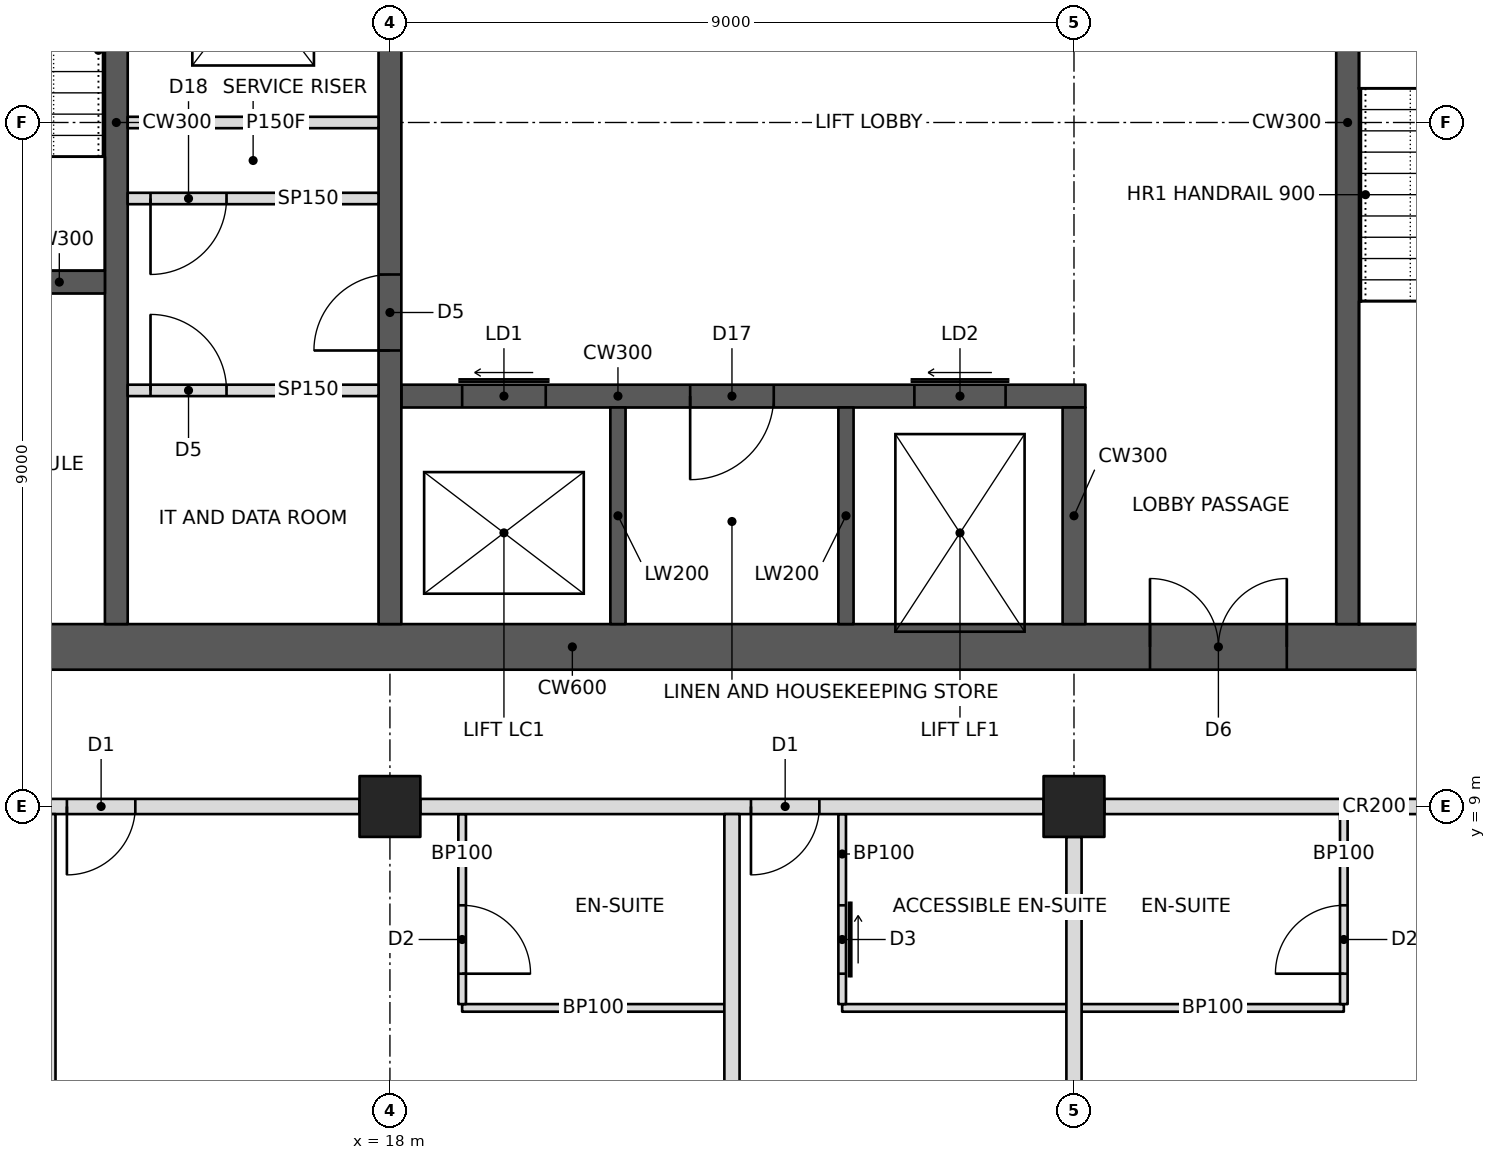
"""IFC4 building model, lengths in metres.
Left out: names, types, materials, properties, quantities, classifications, styles, units other than length and angle.
Written with IfcOpenShell. Run it as: python <this file> out.ifc"""

import sys

from ifc_helpers import new_model, si_unit, direction, frame, frame_2d, origin, origin_2d, place, context, subcontext, project, spatial, rectangle, hollow_rectangle, extrude, element, fill, save


model = new_model("IFC4")
c1 = context("Model", 3, precision=1e-05, world=origin(), true_north=direction((0.0, 1.0)))
c2 = subcontext(c1, "Body", "Model", "MODEL_VIEW")
j1 = project(units=[si_unit("LENGTHUNIT", "METRE"), si_unit("PLANEANGLEUNIT", "RADIAN")], contexts=[c1])
p1 = place(None, origin())
s1 = spatial("IfcSite", under=j1, at=p1, CompositionType="ELEMENT")
p2 = place(p1, origin())
s2 = spatial("IfcBuilding", under=s1, at=p2, CompositionType="ELEMENT")
p3 = place(p2, frame((0.0, 0.0, 233.8)))
s3 = spatial("IfcBuildingStorey", under=s2, at=p3, CompositionType="ELEMENT", Elevation=233.8)
for number, where, z_axis, x_axis in (
    (1, (18.0, 9.0, 0.0), (0.0, 0.0, 1.0), (1.0, 0.0, 0.0)),
    (2, (27.0, 9.0, 0.0), (0.0, 0.0, 1.0), (1.0, 0.0, 0.0)),
):
    element("IfcColumn", number, at=place(p3, frame(where, z_axis=z_axis, x_axis=x_axis)), inside=s3, PredefinedType="COLUMN", context=c2, shape_type="SweptSolid", body=[
        extrude(hollow_rectangle(XDim=0.8, YDim=0.8, WallThickness=0.04, at=origin_2d()), origin(), (0.0, 0.0, 1.0), 3.6),
    ])
p4 = place(p3, frame((10.8, 11.1, 0.0), z_axis=(0.0, 0.0, 1.0), x_axis=(1.0, 0.0, 0.0)))
e3 = element("IfcWall", 3, at=p4, inside=s3, PredefinedType="SHEAR", context=c2, shape_type="SweptSolid", body=[
    extrude(rectangle(XDim=23.4, YDim=0.6, at=frame_2d((11.7, 0.0))), origin(), (0.0, 0.0, 1.0), 3.6),
])
p5 = place(p4, frame((1.0, 0.0, 0.0)))
e4 = element("IfcOpeningElement", 4, at=p5, cuts=e3, PredefinedType="OPENING", context=c2, shape_type="SweptSolid", body=[
    extrude(rectangle(XDim=1.0, YDim=2.1, at=frame_2d((0.5, 1.05))), frame((0.0, 0.31, 0.0), z_axis=(0.0, -1.0, 0.0), x_axis=(1.0, 0.0, 0.0)), (0.0, 0.0, 1.0), 0.62),
])
p6 = place(p4, frame((17.2, 0.0, 0.0)))
e5 = element("IfcOpeningElement", 5, at=p6, cuts=e3, PredefinedType="OPENING", context=c2, shape_type="SweptSolid", body=[
    extrude(rectangle(XDim=1.8, YDim=2.1, at=frame_2d((0.9, 1.05))), frame((0.0, 0.31, 0.0), z_axis=(0.0, -1.0, 0.0), x_axis=(1.0, 0.0, 0.0)), (0.0, 0.0, 1.0), 0.62),
])
p7 = place(p3, frame((14.4, 11.4, 0.0), z_axis=(0.0, 0.0, 1.0), x_axis=(0.0, 1.0, 0.0)))
e6 = element("IfcWall", 6, at=p7, inside=s3, PredefinedType="SHEAR", context=c2, shape_type="SweptSolid", body=[
    extrude(rectangle(XDim=13.2, YDim=0.3, at=frame_2d((6.6, 0.0))), origin(), (0.0, 0.0, 1.0), 3.6),
])
p8 = place(p3, frame((11.4, 15.9, 0.0), z_axis=(0.0, 0.0, 1.0), x_axis=(1.0, 0.0, 0.0)))
e7 = element("IfcWall", 7, at=p8, inside=s3, PredefinedType="SHEAR", context=c2, shape_type="SweptSolid", body=[
    extrude(rectangle(XDim=2.85, YDim=0.3, at=frame_2d((1.425, 0.0))), origin(), (0.0, 0.0, 1.0), 3.6),
])
p9 = place(p8, frame((0.5, 0.0, 0.0)))
e8 = element("IfcOpeningElement", 8, at=p9, cuts=e7, PredefinedType="OPENING", context=c2, shape_type="SweptSolid", body=[
    extrude(rectangle(XDim=1.0, YDim=2.1, at=frame_2d((0.5, 1.05))), frame((0.0, 0.16, 0.0), z_axis=(0.0, -1.0, 0.0), x_axis=(1.0, 0.0, 0.0)), (0.0, 0.0, 1.0), 0.32),
])
p10 = place(p3, frame((18.0, 11.4, 0.0), z_axis=(0.0, 0.0, 1.0), x_axis=(0.0, 1.0, 0.0)))
e9 = element("IfcWall", 9, at=p10, inside=s3, PredefinedType="SHEAR", context=c2, shape_type="SweptSolid", body=[
    extrude(rectangle(XDim=13.2, YDim=0.3, at=frame_2d((6.6, 0.0))), origin(), (0.0, 0.0, 1.0), 3.6),
])
p11 = place(p10, frame((3.6, 0.0, 0.0)))
e10 = element("IfcOpeningElement", 10, at=p11, cuts=e9, PredefinedType="OPENING", context=c2, shape_type="SweptSolid", body=[
    extrude(rectangle(XDim=1.0, YDim=2.1, at=frame_2d((0.5, 1.05))), frame((0.0, 0.16, 0.0), z_axis=(0.0, -1.0, 0.0), x_axis=(1.0, 0.0, 0.0)), (0.0, 0.0, 1.0), 0.32),
])
p12 = place(p10, frame((7.85, 0.0, 0.0)))
e11 = element("IfcOpeningElement", 11, at=p12, cuts=e9, PredefinedType="OPENING", context=c2, shape_type="SweptSolid", body=[
    extrude(rectangle(XDim=1.1, YDim=2.1, at=frame_2d((0.55, 1.05))), frame((0.0, 0.16, 0.0), z_axis=(0.0, -1.0, 0.0), x_axis=(1.0, 0.0, 0.0)), (0.0, 0.0, 1.0), 0.32),
])
p13 = place(p3, frame((14.55, 18.0, 0.0), z_axis=(0.0, 0.0, 1.0), x_axis=(1.0, 0.0, 0.0)))
e12 = element("IfcWall", 12, at=p13, inside=s3, PredefinedType="PARTITIONING", context=c2, shape_type="SweptSolid", body=[
    extrude(rectangle(XDim=3.3, YDim=0.15, at=frame_2d((1.65, 0.0))), origin(), (0.0, 0.0, 1.0), 3.4),
])
p14 = place(p3, frame((18.15, 14.4, 0.0), z_axis=(0.0, 0.0, 1.0), x_axis=(1.0, 0.0, 0.0)))
e13 = element("IfcWall", 13, at=p14, inside=s3, PredefinedType="SHEAR", context=c2, shape_type="SweptSolid", body=[
    extrude(rectangle(XDim=9.0, YDim=0.3, at=frame_2d((4.5, 0.0))), origin(), (0.0, 0.0, 1.0), 3.6),
])
p15 = place(p14, frame((0.8, 0.0, 0.0)))
e14 = element("IfcOpeningElement", 14, at=p15, cuts=e13, PredefinedType="OPENING", context=c2, shape_type="SweptSolid", body=[
    extrude(rectangle(XDim=1.1, YDim=2.1, at=frame_2d((0.55, 1.05))), frame((0.0, 0.16, 0.0), z_axis=(0.0, -1.0, 0.0), x_axis=(1.0, 0.0, 0.0)), (0.0, 0.0, 1.0), 0.32),
])
p16 = place(p14, frame((6.75, 0.0, 0.0)))
e15 = element("IfcOpeningElement", 15, at=p16, cuts=e13, PredefinedType="OPENING", context=c2, shape_type="SweptSolid", body=[
    extrude(rectangle(XDim=1.2, YDim=2.1, at=frame_2d((0.6, 1.05))), frame((0.0, 0.16, 0.0), z_axis=(0.0, -1.0, 0.0), x_axis=(1.0, 0.0, 0.0)), (0.0, 0.0, 1.0), 0.32),
])
p17 = place(p14, frame((3.8, 0.0, 0.0)))
e16 = element("IfcOpeningElement", 16, at=p17, cuts=e13, PredefinedType="OPENING", context=c2, shape_type="SweptSolid", body=[
    extrude(rectangle(XDim=1.1, YDim=2.1, at=frame_2d((0.55, 1.05))), frame((0.0, 0.16, 0.0), z_axis=(0.0, -1.0, 0.0), x_axis=(1.0, 0.0, 0.0)), (0.0, 0.0, 1.0), 0.32),
])
p18 = place(p3, frame((27.0, 11.4, 0.0), z_axis=(0.0, 0.0, 1.0), x_axis=(0.0, 1.0, 0.0)))
e17 = element("IfcWall", 17, at=p18, inside=s3, PredefinedType="SHEAR", context=c2, shape_type="SweptSolid", body=[
    extrude(rectangle(XDim=2.85, YDim=0.3, at=frame_2d((1.425, 0.0))), origin(), (0.0, 0.0, 1.0), 3.6),
])
for number, where, z_axis, x_axis in (
    (18, (21.0, 11.4, 0.0), (0.0, 0.0, 1.0), (0.0, 1.0, 0.0)),
    (19, (24.0, 11.4, 0.0), (0.0, 0.0, 1.0), (0.0, 1.0, 0.0)),
):
    element("IfcWall", number, at=place(p3, frame(where, z_axis=z_axis, x_axis=x_axis)), inside=s3, PredefinedType="SHEAR", context=c2, shape_type="SweptSolid", body=[
        extrude(rectangle(XDim=2.85, YDim=0.2, at=frame_2d((1.425, 0.0))), origin(), (0.0, 0.0, 1.0), 3.6),
    ])
p19 = place(p3, frame((30.6, 11.4, 0.0), z_axis=(0.0, 0.0, 1.0), x_axis=(0.0, 1.0, 0.0)))
e20 = element("IfcWall", 20, at=p19, inside=s3, PredefinedType="SHEAR", context=c2, shape_type="SweptSolid", body=[
    extrude(rectangle(XDim=13.2, YDim=0.3, at=frame_2d((6.6, 0.0))), origin(), (0.0, 0.0, 1.0), 3.6),
])
p20 = place(p3, frame((9.4, 9.0, 0.0), z_axis=(0.0, 0.0, 1.0), x_axis=(1.0, 0.0, 0.0)))
e21 = element("IfcWall", 21, at=p20, inside=s3, PredefinedType="PARTITIONING", context=c2, shape_type="SweptSolid", body=[
    extrude(rectangle(XDim=8.2, YDim=0.2, at=frame_2d((4.1, 0.0))), origin(), (0.0, 0.0, 1.0), 2.605),
])
p21 = place(p20, frame((2.95, 0.0, 0.0)))
e22 = element("IfcOpeningElement", 22, at=p21, cuts=e21, PredefinedType="OPENING", context=c2, shape_type="SweptSolid", body=[
    extrude(rectangle(XDim=0.9, YDim=2.1, at=frame_2d((0.45, 1.05))), frame((0.0, 0.11, 0.0), z_axis=(0.0, -1.0, 0.0), x_axis=(1.0, 0.0, 0.0)), (0.0, 0.0, 1.0), 0.22),
])
p22 = place(p20, frame((4.35, 0.0, 0.0)))
e23 = element("IfcOpeningElement", 23, at=p22, cuts=e21, PredefinedType="OPENING", context=c2, shape_type="SweptSolid", body=[
    extrude(rectangle(XDim=0.9, YDim=2.1, at=frame_2d((0.45, 1.05))), frame((0.0, 0.11, 0.0), z_axis=(0.0, -1.0, 0.0), x_axis=(1.0, 0.0, 0.0)), (0.0, 0.0, 1.0), 0.22),
])
p23 = place(p3, frame((18.4, 9.0, 0.0), z_axis=(0.0, 0.0, 1.0), x_axis=(1.0, 0.0, 0.0)))
e24 = element("IfcWall", 24, at=p23, inside=s3, PredefinedType="PARTITIONING", context=c2, shape_type="SweptSolid", body=[
    extrude(rectangle(XDim=8.2, YDim=0.2, at=frame_2d((4.1, 0.0))), origin(), (0.0, 0.0, 1.0), 2.605),
])
p24 = place(p23, frame((4.35, 0.0, 0.0)))
e25 = element("IfcOpeningElement", 25, at=p24, cuts=e24, PredefinedType="OPENING", context=c2, shape_type="SweptSolid", body=[
    extrude(rectangle(XDim=0.9, YDim=2.1, at=frame_2d((0.45, 1.05))), frame((0.0, 0.11, 0.0), z_axis=(0.0, -1.0, 0.0), x_axis=(1.0, 0.0, 0.0)), (0.0, 0.0, 1.0), 0.22),
])
p25 = place(p3, frame((27.4, 9.0, 0.0), z_axis=(0.0, 0.0, 1.0), x_axis=(1.0, 0.0, 0.0)))
e26 = element("IfcWall", 26, at=p25, inside=s3, PredefinedType="PARTITIONING", context=c2, shape_type="SweptSolid", body=[
    extrude(rectangle(XDim=8.368, YDim=0.2, at=frame_2d((4.184, 0.0))), origin(), (0.0, 0.0, 1.0), 2.605),
])
p26 = place(p25, frame((7.25, 0.0, 0.0)))
e27 = element("IfcOpeningElement", 27, at=p26, cuts=e26, PredefinedType="OPENING", context=c2, shape_type="SweptSolid", body=[
    extrude(rectangle(XDim=0.9, YDim=2.1, at=frame_2d((0.45, 1.05))), frame((0.0, 0.11, 0.0), z_axis=(0.0, -1.0, 0.0), x_axis=(1.0, 0.0, 0.0)), (0.0, 0.0, 1.0), 0.22),
])
for number, where, z_axis, x_axis in (
    (28, (13.5, 8.9, 0.0), (0.0, 0.0, 1.0), (0.0, -1.0, 0.0)),
    (29, (22.5, 8.9, 0.0), (0.0, 0.0, 1.0), (0.0, -1.0, 0.0)),
):
    element("IfcWall", number, at=place(p3, frame(where, z_axis=z_axis, x_axis=x_axis)), inside=s3, PredefinedType="PARTITIONING", context=c2, shape_type="SweptSolid", body=[
        extrude(rectangle(XDim=7.9, YDim=0.2, at=frame_2d((3.95, 0.0))), origin(), (0.0, 0.0, 1.0), 2.604),
    ])
p27 = place(p3, frame((27.0, 8.6, 0.0), z_axis=(0.0, 0.0, 1.0), x_axis=(0.0, -1.0, 0.0)))
e30 = element("IfcWall", 30, at=p27, inside=s3, PredefinedType="PARTITIONING", context=c2, shape_type="SweptSolid", body=[
    extrude(rectangle(XDim=7.6, YDim=0.2, at=frame_2d((3.8, 0.0))), origin(), (0.0, 0.0, 1.0), 2.605),
])
p28 = place(p3, frame((18.95, 6.35, 0.0), z_axis=(0.0, 0.0, 1.0), x_axis=(1.0, 0.0, 0.0)))
e31 = element("IfcWall", 31, at=p28, inside=s3, PredefinedType="PARTITIONING", context=c2, shape_type="SweptSolid", body=[
    extrude(rectangle(XDim=3.45, YDim=0.1, at=frame_2d((1.725, 0.0))), origin(), (0.0, 0.0, 1.0), 3.4),
])
p29 = place(p3, frame((18.95, 8.9, 0.0), z_axis=(0.0, 0.0, 1.0), x_axis=(0.0, -1.0, 0.0)))
e32 = element("IfcWall", 32, at=p29, inside=s3, PredefinedType="PARTITIONING", context=c2, shape_type="SweptSolid", body=[
    extrude(rectangle(XDim=2.5, YDim=0.1, at=frame_2d((1.25, 0.0))), origin(), (0.0, 0.0, 1.0), 2.604),
])
p30 = place(p29, frame((1.2, 0.0, 0.0)))
e33 = element("IfcOpeningElement", 33, at=p30, cuts=e32, PredefinedType="OPENING", context=c2, shape_type="SweptSolid", body=[
    extrude(rectangle(XDim=0.9, YDim=2.1, at=frame_2d((0.45, 1.05))), frame((0.0, 0.06, 0.0), z_axis=(0.0, -1.0, 0.0), x_axis=(1.0, 0.0, 0.0)), (0.0, 0.0, 1.0), 0.12),
])
p31 = place(p3, frame((23.95, 6.35, 0.0), z_axis=(0.0, 0.0, 1.0), x_axis=(1.0, 0.0, 0.0)))
e34 = element("IfcWall", 34, at=p31, inside=s3, PredefinedType="PARTITIONING", context=c2, shape_type="SweptSolid", body=[
    extrude(rectangle(XDim=2.95, YDim=0.1, at=frame_2d((1.475, 0.0))), origin(), (0.0, 0.0, 1.0), 2.604),
])
p32 = place(p3, frame((23.95, 8.9, 0.0), z_axis=(0.0, 0.0, 1.0), x_axis=(0.0, -1.0, 0.0)))
e35 = element("IfcWall", 35, at=p32, inside=s3, PredefinedType="PARTITIONING", context=c2, shape_type="SweptSolid", body=[
    extrude(rectangle(XDim=2.5, YDim=0.1, at=frame_2d((1.25, 0.0))), origin(), (0.0, 0.0, 1.0), 2.604),
])
p33 = place(p32, frame((1.2, 0.0, 0.0)))
e36 = element("IfcOpeningElement", 36, at=p33, cuts=e35, PredefinedType="OPENING", context=c2, shape_type="SweptSolid", body=[
    extrude(rectangle(XDim=0.9, YDim=2.1, at=frame_2d((0.45, 1.05))), frame((0.0, 0.06, 0.0), z_axis=(0.0, -1.0, 0.0), x_axis=(1.0, 0.0, 0.0)), (0.0, 0.0, 1.0), 0.12),
])
p34 = place(p3, frame((27.1, 6.35, 0.0), z_axis=(0.0, 0.0, 1.0), x_axis=(1.0, 0.0, 0.0)))
e37 = element("IfcWall", 37, at=p34, inside=s3, PredefinedType="PARTITIONING", context=c2, shape_type="SweptSolid", body=[
    extrude(rectangle(XDim=3.45, YDim=0.1, at=frame_2d((1.725, 0.0))), origin(), (0.0, 0.0, 1.0), 2.604),
])
p35 = place(p3, frame((30.55, 8.9, 0.0), z_axis=(0.0, 0.0, 1.0), x_axis=(0.0, -1.0, 0.0)))
e38 = element("IfcWall", 38, at=p35, inside=s3, PredefinedType="PARTITIONING", context=c2, shape_type="SweptSolid", body=[
    extrude(rectangle(XDim=2.5, YDim=0.1, at=frame_2d((1.25, 0.0))), origin(), (0.0, 0.0, 1.0), 2.604),
])
p36 = place(p35, frame((1.2, 0.0, 0.0)))
e39 = element("IfcOpeningElement", 39, at=p36, cuts=e38, PredefinedType="OPENING", context=c2, shape_type="SweptSolid", body=[
    extrude(rectangle(XDim=0.9, YDim=2.1, at=frame_2d((0.45, 1.05))), frame((0.0, 0.06, 0.0), z_axis=(0.0, -1.0, 0.0), x_axis=(1.0, 0.0, 0.0)), (0.0, 0.0, 1.0), 0.12),
])
p37 = place(p3, frame((14.55, 17.0, 0.0), z_axis=(0.0, 0.0, 1.0), x_axis=(1.0, 0.0, 0.0)))
e40 = element("IfcWall", 40, at=p37, inside=s3, PredefinedType="PARTITIONING", context=c2, shape_type="SweptSolid", body=[
    extrude(rectangle(XDim=3.3, YDim=0.15, at=frame_2d((1.65, 0.0))), origin(), (0.0, 0.0, 1.0), 3.4),
])
p38 = place(p37, frame((0.3, 0.0, 0.0)))
e41 = element("IfcOpeningElement", 41, at=p38, cuts=e40, PredefinedType="OPENING", context=c2, shape_type="SweptSolid", body=[
    extrude(rectangle(XDim=1.0, YDim=2.1, at=frame_2d((0.5, 1.05))), frame((0.0, 0.085, 0.0), z_axis=(0.0, -1.0, 0.0), x_axis=(1.0, 0.0, 0.0)), (0.0, 0.0, 1.0), 0.17),
])
p39 = place(p3, frame((14.55, 14.475, 0.0), z_axis=(0.0, 0.0, 1.0), x_axis=(1.0, 0.0, 0.0)))
e42 = element("IfcWall", 42, at=p39, inside=s3, PredefinedType="PARTITIONING", context=c2, shape_type="SweptSolid", body=[
    extrude(rectangle(XDim=3.3, YDim=0.15, at=frame_2d((1.65, 0.0))), origin(), (0.0, 0.0, 1.0), 3.4),
])
p40 = place(p39, frame((0.3, 0.0, 0.0)))
e43 = element("IfcOpeningElement", 43, at=p40, cuts=e42, PredefinedType="OPENING", context=c2, shape_type="SweptSolid", body=[
    extrude(rectangle(XDim=1.0, YDim=2.1, at=frame_2d((0.5, 1.05))), frame((0.0, 0.085, 0.0), z_axis=(0.0, -1.0, 0.0), x_axis=(1.0, 0.0, 0.0)), (0.0, 0.0, 1.0), 0.17),
])
p41 = place(p30, origin())
e44 = element("IfcDoor", 44, at=p41, inside=s3, OperationType="SINGLE_SWING_RIGHT", PredefinedType="DOOR", context=c2, shape_type="SweptSolid", body=[
    extrude(rectangle(XDim=0.9, YDim=2.1, at=frame_2d((0.45, 1.05))), frame((0.0, 0.025, 0.0), z_axis=(0.0, -1.0, 0.0), x_axis=(1.0, 0.0, 0.0)), (0.0, 0.0, 1.0), 0.05),
])
fill(e33, e44)
p42 = place(p22, frame((0.9, 0.0, 0.0), z_axis=(0.0, 0.0, 1.0), x_axis=(-1.0, 0.0, 0.0)))
e45 = element("IfcDoor", 45, at=p42, inside=s3, OperationType="SINGLE_SWING_RIGHT", PredefinedType="DOOR", context=c2, shape_type="SweptSolid", body=[
    extrude(rectangle(XDim=0.9, YDim=2.1, at=frame_2d((0.45, 1.05))), frame((0.0, 0.025, 0.0), z_axis=(0.0, -1.0, 0.0), x_axis=(1.0, 0.0, 0.0)), (0.0, 0.0, 1.0), 0.05),
])
fill(e23, e45)
p43 = place(p33, origin())
e46 = element("IfcDoor", 46, at=p43, inside=s3, OperationType="SLIDING_TO_LEFT", PredefinedType="DOOR", context=c2, shape_type="SweptSolid", body=[
    extrude(rectangle(XDim=0.9, YDim=2.1, at=frame_2d((0.45, 1.05))), frame((0.0, 0.025, 0.0), z_axis=(0.0, -1.0, 0.0), x_axis=(1.0, 0.0, 0.0)), (0.0, 0.0, 1.0), 0.05),
])
fill(e36, e46)
p44 = place(p24, frame((0.9, 0.0, 0.0), z_axis=(0.0, 0.0, 1.0), x_axis=(-1.0, 0.0, 0.0)))
e47 = element("IfcDoor", 47, at=p44, inside=s3, OperationType="SINGLE_SWING_RIGHT", PredefinedType="DOOR", context=c2, shape_type="SweptSolid", body=[
    extrude(rectangle(XDim=0.9, YDim=2.1, at=frame_2d((0.45, 1.05))), frame((0.0, 0.025, 0.0), z_axis=(0.0, -1.0, 0.0), x_axis=(1.0, 0.0, 0.0)), (0.0, 0.0, 1.0), 0.05),
])
fill(e25, e47)
p45 = place(p36, frame((0.9, 0.0, 0.0), z_axis=(0.0, 0.0, 1.0), x_axis=(-1.0, 0.0, 0.0)))
e48 = element("IfcDoor", 48, at=p45, inside=s3, OperationType="SINGLE_SWING_LEFT", PredefinedType="DOOR", context=c2, shape_type="SweptSolid", body=[
    extrude(rectangle(XDim=0.9, YDim=2.1, at=frame_2d((0.45, 1.05))), frame((0.0, 0.025, 0.0), z_axis=(0.0, -1.0, 0.0), x_axis=(1.0, 0.0, 0.0)), (0.0, 0.0, 1.0), 0.05),
])
fill(e39, e48)
p46 = place(p38, frame((1.0, 0.0, 0.0), z_axis=(0.0, 0.0, 1.0), x_axis=(-1.0, 0.0, 0.0)))
e49 = element("IfcDoor", 49, at=p46, inside=s3, OperationType="SINGLE_SWING_RIGHT", PredefinedType="DOOR", context=c2, shape_type="SweptSolid", body=[
    extrude(rectangle(XDim=1.0, YDim=2.1, at=frame_2d((0.5, 1.05))), frame((0.0, 0.025, 0.0), z_axis=(0.0, -1.0, 0.0), x_axis=(1.0, 0.0, 0.0)), (0.0, 0.0, 1.0), 0.05),
])
fill(e41, e49)
p47 = place(p40, origin())
e50 = element("IfcDoor", 50, at=p47, inside=s3, OperationType="SINGLE_SWING_LEFT", PredefinedType="DOOR", context=c2, shape_type="SweptSolid", body=[
    extrude(rectangle(XDim=1.0, YDim=2.1, at=frame_2d((0.5, 1.05))), frame((0.0, 0.025, 0.0), z_axis=(0.0, -1.0, 0.0), x_axis=(1.0, 0.0, 0.0)), (0.0, 0.0, 1.0), 0.05),
])
fill(e43, e50)
p48 = place(p6, origin())
e51 = element("IfcDoor", 51, at=p48, inside=s3, OperationType="DOUBLE_DOOR_SINGLE_SWING", PredefinedType="DOOR", context=c2, shape_type="SweptSolid", body=[
    extrude(rectangle(XDim=1.8, YDim=2.1, at=frame_2d((0.9, 1.05))), frame((0.0, 0.025, 0.0), z_axis=(0.0, -1.0, 0.0), x_axis=(1.0, 0.0, 0.0)), (0.0, 0.0, 1.0), 0.05),
])
fill(e5, e51)
p49 = place(p11, origin())
e52 = element("IfcDoor", 52, at=p49, inside=s3, OperationType="SINGLE_SWING_LEFT", PredefinedType="DOOR", context=c2, shape_type="SweptSolid", body=[
    extrude(rectangle(XDim=1.0, YDim=2.1, at=frame_2d((0.5, 1.05))), frame((0.0, 0.025, 0.0), z_axis=(0.0, -1.0, 0.0), x_axis=(1.0, 0.0, 0.0)), (0.0, 0.0, 1.0), 0.05),
])
fill(e10, e52)
p50 = place(p15, origin())
e53 = element("IfcDoor", 53, at=p50, inside=s3, OperationType="SLIDING_TO_LEFT", PredefinedType="DOOR", context=c2, shape_type="SweptSolid", body=[
    extrude(rectangle(XDim=1.1, YDim=2.1, at=frame_2d((0.55, 1.05))), frame((0.0, 0.025, 0.0), z_axis=(0.0, -1.0, 0.0), x_axis=(1.0, 0.0, 0.0)), (0.0, 0.0, 1.0), 0.05),
])
fill(e14, e53)
p51 = place(p16, origin())
e54 = element("IfcDoor", 54, at=p51, inside=s3, OperationType="SLIDING_TO_LEFT", PredefinedType="DOOR", context=c2, shape_type="SweptSolid", body=[
    extrude(rectangle(XDim=1.2, YDim=2.1, at=frame_2d((0.6, 1.05))), frame((0.0, 0.025, 0.0), z_axis=(0.0, -1.0, 0.0), x_axis=(1.0, 0.0, 0.0)), (0.0, 0.0, 1.0), 0.05),
])
fill(e15, e54)
p52 = place(p17, frame((1.1, 0.0, 0.0), z_axis=(0.0, 0.0, 1.0), x_axis=(-1.0, 0.0, 0.0)))
e55 = element("IfcDoor", 55, at=p52, inside=s3, OperationType="SINGLE_SWING_RIGHT", PredefinedType="DOOR", context=c2, shape_type="SweptSolid", body=[
    extrude(rectangle(XDim=1.1, YDim=2.1, at=frame_2d((0.55, 1.05))), frame((0.0, 0.025, 0.0), z_axis=(0.0, -1.0, 0.0), x_axis=(1.0, 0.0, 0.0)), (0.0, 0.0, 1.0), 0.05),
])
fill(e16, e55)
save(model, sys.argv[1])
